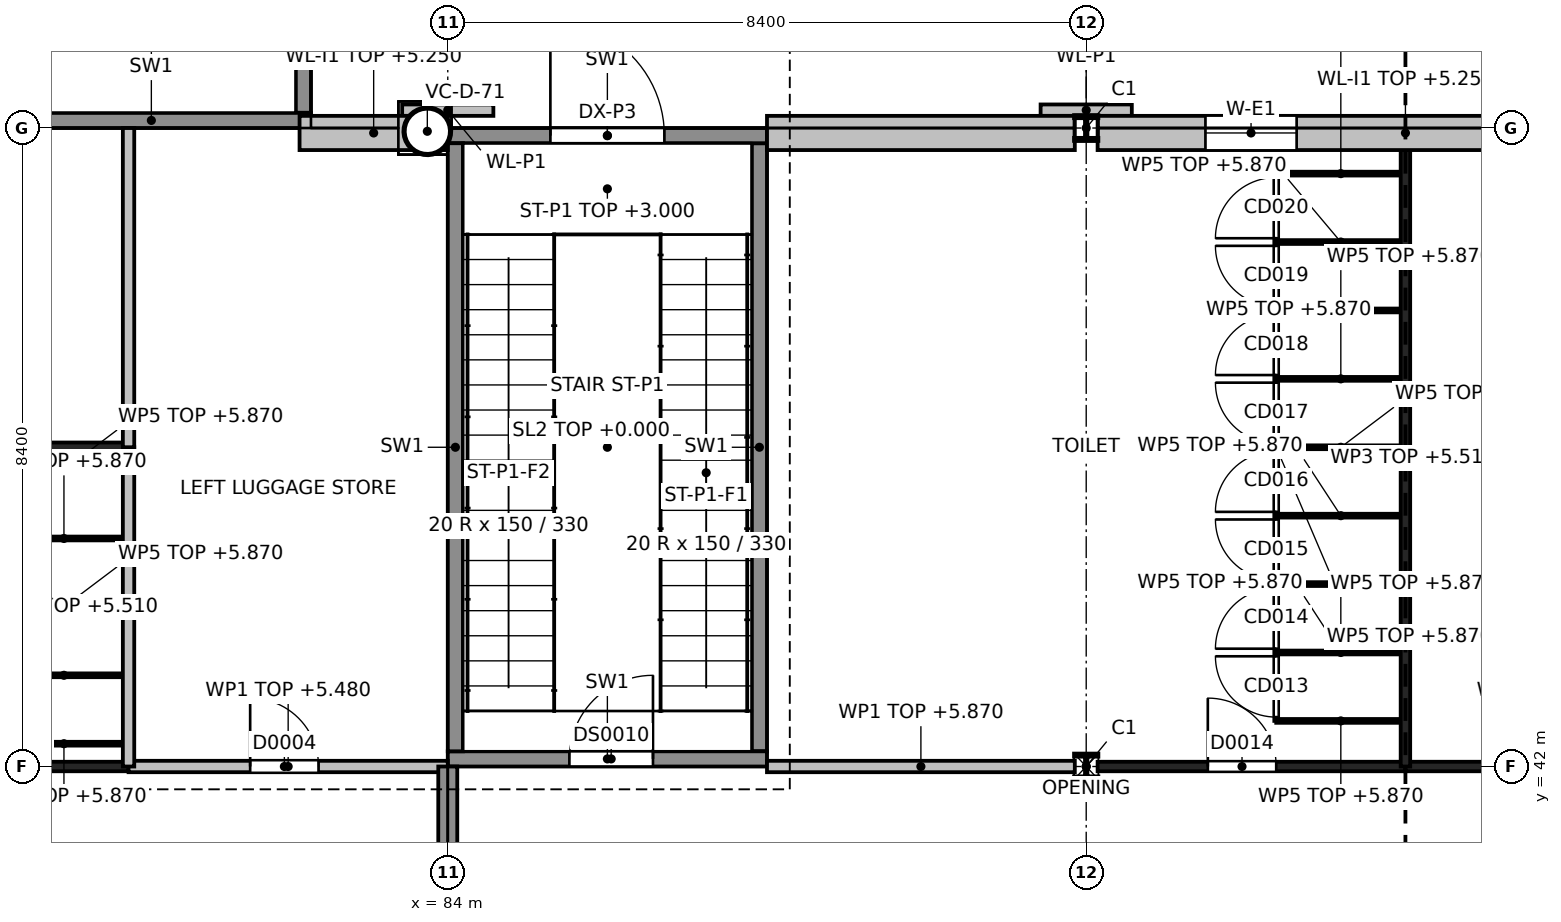
"""IFC4 building model, lengths in metres.
Left out: names, types, materials, properties, quantities, classifications, styles, units other than length and angle.
Written with IfcOpenShell. Run it as: python <this file> out.ifc"""

import sys

from ifc_helpers import new_model, si_unit, direction, frame, frame_2d, origin, origin_2d, place, context, subcontext, project, spatial, rectangle, hollow_circle, i_section, extrude, element, fill, save


model = new_model("IFC4")
c1 = context("Model", 3, precision=1e-05, world=origin(), true_north=direction((0.0, 1.0)))
c2 = subcontext(c1, "Body", "Model", "MODEL_VIEW")
j1 = project(units=[si_unit("LENGTHUNIT", "METRE"), si_unit("PLANEANGLEUNIT", "RADIAN")], contexts=[c1])
p1 = place(None, origin())
s1 = spatial("IfcSite", under=j1, at=p1, CompositionType="ELEMENT")
p2 = place(p1, origin())
s2 = spatial("IfcBuilding", under=s1, at=p2, CompositionType="ELEMENT")
p3 = place(p2, origin())
s3 = spatial("IfcBuildingStorey", under=s2, at=p3, CompositionType="ELEMENT", Elevation=0.0)
p4 = place(p3, frame((83.7, 50.4, -1.35), z_axis=(0.012121219783, -0.01683687241, 0.999784774718), x_axis=(0.811564701734, 0.584262556475, 0.0)))
e1 = element("IfcColumn", 1, at=p4, inside=s3, PredefinedType="COLUMN", context=c2, shape_type="SweptSolid", body=[
    extrude(hollow_circle(Radius=0.305, WallThickness=0.02, at=origin_2d()), origin(), (0.0, 0.0, 1.0), 7.352),
])
for number, where, z_axis, x_axis in (
    (2, (92.4, 42.0, -1.35), (0.0, 0.0, 1.0), (1.0, 0.0, 0.0)),
    (3, (92.4, 50.4, -1.35), (0.0, 0.0, 1.0), (1.0, 0.0, 0.0)),
):
    element("IfcColumn", number, at=place(p3, frame(where, z_axis=z_axis, x_axis=x_axis)), inside=s3, PredefinedType="COLUMN", context=c2, shape_type="SweptSolid", body=[
        extrude(i_section(OverallWidth=0.3, OverallDepth=0.32, WebThickness=0.011, FlangeThickness=0.021, at=origin_2d()), origin(), (0.0, 0.0, 1.0), 7.35),
    ])
p5 = place(p3, frame((78.0, 50.5, -1.35), z_axis=(0.0, 0.0, 1.0), x_axis=(1.0, 0.0, 0.0)))
e4 = element("IfcWall", 4, at=p5, inside=s3, PredefinedType="SHEAR", context=c2, shape_type="SweptSolid", body=[
    extrude(rectangle(XDim=4.2, YDim=0.2, at=frame_2d((2.1, 0.0))), origin(), (0.0, 0.0, 1.0), 7.35),
])
p6 = place(p3, frame((82.1, 50.6, -1.35), z_axis=(0.0, 0.0, 1.0), x_axis=(0.0, 1.0, 0.0)))
e5 = element("IfcWall", 5, at=p6, inside=s3, PredefinedType="SHEAR", context=c2, shape_type="SweptSolid", body=[
    extrude(rectangle(XDim=8.0, YDim=0.2, at=frame_2d((4.0, 0.0))), origin(), (0.0, 0.0, 1.0), 7.35),
])
p7 = place(p6, frame((3.25, 0.0, 1.35)))
e6 = element("IfcOpeningElement", 6, at=p7, cuts=e5, PredefinedType="OPENING", context=c2, shape_type="SweptSolid", body=[
    extrude(rectangle(XDim=1.5, YDim=2.4, at=frame_2d((0.75, 1.2))), frame((0.0, 0.1, 0.0), z_axis=(0.0, -1.0, 0.0), x_axis=(1.0, 0.0, 0.0)), (0.0, 0.0, 1.0), 0.2),
])
p8 = place(p3, frame((84.0, 42.1, -1.35), z_axis=(0.0, 0.0, 1.0), x_axis=(1.0, 0.0, 0.0)))
e7 = element("IfcWall", 7, at=p8, inside=s3, PredefinedType="SHEAR", context=c2, shape_type="SweptSolid", body=[
    extrude(rectangle(XDim=4.2, YDim=0.2, at=frame_2d((2.1, 0.0))), origin(), (0.0, 0.0, 1.0), 7.35),
])
p9 = place(p8, frame((1.6, 0.0, 1.35)))
e8 = element("IfcOpeningElement", 8, at=p9, cuts=e7, PredefinedType="OPENING", context=c2, shape_type="SweptSolid", body=[
    extrude(rectangle(XDim=1.1, YDim=2.1, at=frame_2d((0.55, 1.05))), frame((0.0, 0.1, 0.0), z_axis=(0.0, -1.0, 0.0), x_axis=(1.0, 0.0, 0.0)), (0.0, 0.0, 1.0), 0.2),
])
p10 = place(p3, frame((84.0, 50.3, -1.35), z_axis=(0.0, 0.0, 1.0), x_axis=(1.0, 0.0, 0.0)))
e9 = element("IfcWall", 9, at=p10, inside=s3, PredefinedType="SHEAR", context=c2, shape_type="SweptSolid", body=[
    extrude(rectangle(XDim=4.2, YDim=0.2, at=frame_2d((2.1, 0.0))), origin(), (0.0, 0.0, 1.0), 7.35),
])
p11 = place(p10, frame((1.35, 0.0, 1.35)))
e10 = element("IfcOpeningElement", 10, at=p11, cuts=e9, PredefinedType="OPENING", context=c2, shape_type="SweptSolid", body=[
    extrude(rectangle(XDim=1.5, YDim=2.4, at=frame_2d((0.75, 1.2))), frame((0.0, 0.1, 0.0), z_axis=(0.0, -1.0, 0.0), x_axis=(1.0, 0.0, 0.0)), (0.0, 0.0, 1.0), 0.2),
])
for number, where, z_axis, x_axis in (
    (11, (84.1, 42.2, -1.35), (0.0, 0.0, 1.0), (0.0, 1.0, 0.0)),
    (12, (88.1, 42.2, -1.35), (0.0, 0.0, 1.0), (0.0, 1.0, 0.0)),
):
    element("IfcWall", number, at=place(p3, frame(where, z_axis=z_axis, x_axis=x_axis)), inside=s3, PredefinedType="SHEAR", context=c2, shape_type="SweptSolid", body=[
        extrude(rectangle(XDim=8.0, YDim=0.2, at=frame_2d((4.0, 0.0))), origin(), (0.0, 0.0, 1.0), 7.35),
    ])
p12 = place(p3, frame((82.05, 50.335, 0.0), z_axis=(0.0, 0.0, 1.0), x_axis=(1.0, 0.0, 0.0)))
e13 = element("IfcWall", 13, at=p12, inside=s3, PredefinedType="SOLIDWALL", context=c2, shape_type="SweptSolid", body=[
    extrude(rectangle(XDim=1.95, YDim=0.45, at=frame_2d((0.975, 0.0))), origin(), (0.0, 0.0, 1.0), 5.25),
])
p13 = place(p3, frame((88.2, 50.335, 0.0), z_axis=(0.0, 0.0, 1.0), x_axis=(1.0, 0.0, 0.0)))
e14 = element("IfcWall", 14, at=p13, inside=s3, PredefinedType="SOLIDWALL", context=c2, shape_type="SweptSolid", body=[
    extrude(rectangle(XDim=4.05, YDim=0.45, at=frame_2d((2.025, 0.0))), origin(), (0.0, 0.0, 1.0), 5.25),
])
p14 = place(p3, frame((92.55, 50.335, 0.0), z_axis=(0.0, 0.0, 1.0), x_axis=(1.0, 0.0, 0.0)))
e15 = element("IfcWall", 15, at=p14, inside=s3, PredefinedType="SOLIDWALL", context=c2, shape_type="SweptSolid", body=[
    extrude(rectangle(XDim=8.1, YDim=0.45, at=frame_2d((4.05, 0.0))), origin(), (0.0, 0.0, 1.0), 5.25),
])
p15 = place(p14, frame((1.419, 0.0, 0.9)))
e16 = element("IfcOpeningElement", 16, at=p15, cuts=e15, PredefinedType="OPENING", context=c2, shape_type="SweptSolid", body=[
    extrude(rectangle(XDim=1.2, YDim=3.0, at=frame_2d((0.6, 1.5))), frame((0.0, 0.225, 0.0), z_axis=(0.0, -1.0, 0.0), x_axis=(1.0, 0.0, 0.0)), (0.0, 0.0, 1.0), 0.45),
])
p16 = place(p14, frame((5.481, 0.0, 0.9)))
e17 = element("IfcOpeningElement", 17, at=p16, cuts=e15, PredefinedType="OPENING", context=c2, shape_type="SweptSolid", body=[
    extrude(rectangle(XDim=1.2, YDim=3.0, at=frame_2d((0.6, 1.5))), frame((0.0, 0.225, 0.0), z_axis=(0.0, -1.0, 0.0), x_axis=(1.0, 0.0, 0.0)), (0.0, 0.0, 1.0), 0.45),
])
p17 = place(p3, frame((83.4, 50.635, 0.0), z_axis=(0.0, 0.0, 1.0), x_axis=(1.0, 0.0, 0.0)))
e18 = element("IfcWall", 18, at=p17, inside=s3, PredefinedType="SOLIDWALL", context=c2, shape_type="SweptSolid", body=[
    extrude(rectangle(XDim=1.2, YDim=0.15, at=frame_2d((0.6, 0.0))), origin(), (0.0, 0.0, 1.0), 6.0),
])
p18 = place(p3, frame((91.8, 50.635, 0.0), z_axis=(0.0, 0.0, 1.0), x_axis=(1.0, 0.0, 0.0)))
e19 = element("IfcWall", 19, at=p18, inside=s3, PredefinedType="SOLIDWALL", context=c2, shape_type="SweptSolid", body=[
    extrude(rectangle(XDim=1.2, YDim=0.15, at=frame_2d((0.6, 0.0))), origin(), (0.0, 0.0, 1.0), 6.0),
])
p19 = place(p3, frame((75.75, 42.0, 0.0), z_axis=(0.0, 0.0, 1.0), x_axis=(1.0, 0.0, 0.0)))
e20 = element("IfcWall", 20, at=p19, inside=s3, PredefinedType="PARTITIONING", context=c2, shape_type="SweptSolid", body=[
    extrude(rectangle(XDim=4.05, YDim=0.125, at=frame_2d((2.025, 0.0))), origin(), (0.0, 0.0, 1.0), 5.51),
])
p20 = place(p3, frame((79.8, 42.0, 0.0), z_axis=(0.0, 0.0, 1.0), x_axis=(1.0, 0.0, 0.0)))
e21 = element("IfcWall", 21, at=p20, inside=s3, PredefinedType="PARTITIONING", context=c2, shape_type="SweptSolid", body=[
    extrude(rectangle(XDim=4.2, YDim=0.15, at=frame_2d((2.1, 0.0))), origin(), (0.0, 0.0, 1.0), 5.48),
])
p21 = place(p20, frame((1.6, 0.0, 0.0)))
e22 = element("IfcOpeningElement", 22, at=p21, cuts=e21, PredefinedType="OPENING", context=c2, shape_type="SweptSolid", body=[
    extrude(rectangle(XDim=0.9, YDim=2.1, at=frame_2d((0.45, 1.05))), frame((0.0, 0.075, 0.0), z_axis=(0.0, -1.0, 0.0), x_axis=(1.0, 0.0, 0.0)), (0.0, 0.0, 1.0), 0.15),
])
p22 = place(p3, frame((84.0, 33.6, 0.0), z_axis=(0.0, 0.0, 1.0), x_axis=(0.0, 1.0, 0.0)))
e23 = element("IfcWall", 23, at=p22, inside=s3, PredefinedType="PARTITIONING", context=c2, shape_type="SweptSolid", body=[
    extrude(rectangle(XDim=8.4, YDim=0.25, at=frame_2d((4.2, 0.0))), origin(), (0.0, 0.0, 1.0), 5.48),
])
p23 = place(p22, frame((2.95, 0.0, 0.0)))
e24 = element("IfcOpeningElement", 24, at=p23, cuts=e23, PredefinedType="OPENING", context=c2, shape_type="SweptSolid", body=[
    extrude(rectangle(XDim=2.4, YDim=2.4, at=frame_2d((1.2, 1.2))), frame((0.0, 0.125, 0.0), z_axis=(0.0, -1.0, 0.0), x_axis=(1.0, 0.0, 0.0)), (0.0, 0.0, 1.0), 0.25),
])
p24 = place(p3, frame((75.6, 46.2, 0.0), z_axis=(0.0, 0.0, 1.0), x_axis=(1.0, 0.0, 0.0)))
e25 = element("IfcWall", 25, at=p24, inside=s3, PredefinedType="PARTITIONING", context=c2, shape_type="SweptSolid", body=[
    extrude(rectangle(XDim=4.2, YDim=0.125, at=frame_2d((2.1, 0.0))), origin(), (0.0, 0.0, 1.0), 5.48),
])
for number, where, z_axis, x_axis in (
    (26, (79.8, 42.0, 0.0), (0.0, 0.0, 1.0), (0.0, 1.0, 0.0)),
    (27, (79.8, 46.2, 0.0), (0.0, 0.0, 1.0), (0.0, 1.0, 0.0)),
):
    element("IfcWall", number, at=place(p3, frame(where, z_axis=z_axis, x_axis=x_axis)), inside=s3, PredefinedType="PARTITIONING", context=c2, shape_type="SweptSolid", body=[
        extrude(rectangle(XDim=4.2, YDim=0.15, at=frame_2d((2.1, 0.0))), origin(), (0.0, 0.0, 1.0), 5.51),
    ])
p25 = place(p3, frame((88.2, 42.0, 0.0), z_axis=(0.0, 0.0, 1.0), x_axis=(1.0, 0.0, 0.0)))
e28 = element("IfcWall", 28, at=p25, inside=s3, PredefinedType="PARTITIONING", context=c2, shape_type="SweptSolid", body=[
    extrude(rectangle(XDim=4.05, YDim=0.15, at=frame_2d((2.025, 0.0))), origin(), (0.0, 0.0, 1.0), 5.87),
])
p26 = place(p3, frame((92.55, 42.0, 0.0), z_axis=(0.0, 0.0, 1.0), x_axis=(1.0, 0.0, 0.0)))
e29 = element("IfcWall", 29, at=p26, inside=s3, PredefinedType="PARTITIONING", context=c2, shape_type="SweptSolid", body=[
    extrude(rectangle(XDim=4.05, YDim=0.125, at=frame_2d((2.025, 0.0))), origin(), (0.0, 0.0, 1.0), 5.51),
])
p27 = place(p26, frame((1.45, 0.0, 0.0)))
e30 = element("IfcOpeningElement", 30, at=p27, cuts=e29, PredefinedType="OPENING", context=c2, shape_type="SweptSolid", body=[
    extrude(rectangle(XDim=0.9, YDim=2.1, at=frame_2d((0.45, 1.05))), frame((0.0, 0.062, 0.0), z_axis=(0.0, -1.0, 0.0), x_axis=(1.0, 0.0, 0.0)), (0.0, 0.0, 1.0), 0.125),
])
p28 = place(p3, frame((96.6, 42.0, 0.0), z_axis=(0.0, 0.0, 1.0), x_axis=(1.0, 0.0, 0.0)))
e31 = element("IfcWall", 31, at=p28, inside=s3, PredefinedType="PARTITIONING", context=c2, shape_type="SweptSolid", body=[
    extrude(rectangle(XDim=4.05, YDim=0.125, at=frame_2d((2.025, 0.0))), origin(), (0.0, 0.0, 1.0), 5.51),
])
p29 = place(p28, frame((1.6, 0.0, 0.0)))
e32 = element("IfcOpeningElement", 32, at=p29, cuts=e31, PredefinedType="OPENING", context=c2, shape_type="SweptSolid", body=[
    extrude(rectangle(XDim=1.0, YDim=2.1, at=frame_2d((0.5, 1.05))), frame((0.0, 0.062, 0.0), z_axis=(0.0, -1.0, 0.0), x_axis=(1.0, 0.0, 0.0)), (0.0, 0.0, 1.0), 0.125),
])
p30 = place(p3, frame((96.6, 42.0, 0.0), z_axis=(0.0, 0.0, 1.0), x_axis=(0.0, 1.0, 0.0)))
e33 = element("IfcWall", 33, at=p30, inside=s3, PredefinedType="PARTITIONING", context=c2, shape_type="SweptSolid", body=[
    extrude(rectangle(XDim=8.11, YDim=0.125, at=frame_2d((4.055, 0.0))), origin(), (0.0, 0.0, 1.0), 5.51),
])
for number, where, z_axis, x_axis in (
    (34, (79.8, 42.3, 0.0), (0.0, 0.0, 1.0), (-1.0, 0.0, 0.0)),
    (35, (79.8, 43.2, 0.0), (0.0, 0.0, 1.0), (-1.0, 0.0, 0.0)),
    (36, (79.8, 44.1, 0.0), (0.0, 0.0, 1.0), (-1.0, 0.0, 0.0)),
    (37, (79.8, 45.0, 0.0), (0.0, 0.0, 1.0), (-1.0, 0.0, 0.0)),
    (38, (79.8, 45.9, 0.0), (0.0, 0.0, 1.0), (-1.0, 0.0, 0.0)),
):
    element("IfcWall", number, at=place(p3, frame(where, z_axis=z_axis, x_axis=x_axis)), inside=s3, PredefinedType="PARTITIONING", context=c2, shape_type="SweptSolid", body=[
        extrude(rectangle(XDim=1.7, YDim=0.05, at=frame_2d((0.85, 0.0))), origin(), (0.0, 0.0, 1.0), 5.87),
    ])
p31 = place(p3, frame((94.9, 42.6, 0.0), z_axis=(0.0, 0.0, 1.0), x_axis=(0.0, 1.0, 0.0)))
e39 = element("IfcWall", 39, at=p31, inside=s3, PredefinedType="PARTITIONING", context=c2, shape_type="SweptSolid", body=[
    extrude(rectangle(XDim=7.2, YDim=0.05, at=frame_2d((3.6, 0.0))), origin(), (0.0, 0.0, 1.0), 5.87),
])
p32 = place(p31, frame((0.05, 0.0, 0.0)))
e40 = element("IfcOpeningElement", 40, at=p32, cuts=e39, PredefinedType="OPENING", context=c2, shape_type="SweptSolid", body=[
    extrude(rectangle(XDim=0.8, YDim=2.0, at=frame_2d((0.4, 1.0))), frame((0.0, 0.025, 0.0), z_axis=(0.0, -1.0, 0.0), x_axis=(1.0, 0.0, 0.0)), (0.0, 0.0, 1.0), 0.05),
])
p33 = place(p31, frame((0.95, 0.0, 0.0)))
e41 = element("IfcOpeningElement", 41, at=p33, cuts=e39, PredefinedType="OPENING", context=c2, shape_type="SweptSolid", body=[
    extrude(rectangle(XDim=0.8, YDim=2.0, at=frame_2d((0.4, 1.0))), frame((0.0, 0.025, 0.0), z_axis=(0.0, -1.0, 0.0), x_axis=(1.0, 0.0, 0.0)), (0.0, 0.0, 1.0), 0.05),
])
p34 = place(p31, frame((1.85, 0.0, 0.0)))
e42 = element("IfcOpeningElement", 42, at=p34, cuts=e39, PredefinedType="OPENING", context=c2, shape_type="SweptSolid", body=[
    extrude(rectangle(XDim=0.8, YDim=2.0, at=frame_2d((0.4, 1.0))), frame((0.0, 0.025, 0.0), z_axis=(0.0, -1.0, 0.0), x_axis=(1.0, 0.0, 0.0)), (0.0, 0.0, 1.0), 0.05),
])
p35 = place(p31, frame((2.75, 0.0, 0.0)))
e43 = element("IfcOpeningElement", 43, at=p35, cuts=e39, PredefinedType="OPENING", context=c2, shape_type="SweptSolid", body=[
    extrude(rectangle(XDim=0.8, YDim=2.0, at=frame_2d((0.4, 1.0))), frame((0.0, 0.025, 0.0), z_axis=(0.0, -1.0, 0.0), x_axis=(1.0, 0.0, 0.0)), (0.0, 0.0, 1.0), 0.05),
])
p36 = place(p31, frame((3.65, 0.0, 0.0)))
e44 = element("IfcOpeningElement", 44, at=p36, cuts=e39, PredefinedType="OPENING", context=c2, shape_type="SweptSolid", body=[
    extrude(rectangle(XDim=0.8, YDim=2.0, at=frame_2d((0.4, 1.0))), frame((0.0, 0.025, 0.0), z_axis=(0.0, -1.0, 0.0), x_axis=(1.0, 0.0, 0.0)), (0.0, 0.0, 1.0), 0.05),
])
p37 = place(p31, frame((4.55, 0.0, 0.0)))
e45 = element("IfcOpeningElement", 45, at=p37, cuts=e39, PredefinedType="OPENING", context=c2, shape_type="SweptSolid", body=[
    extrude(rectangle(XDim=0.8, YDim=2.0, at=frame_2d((0.4, 1.0))), frame((0.0, 0.025, 0.0), z_axis=(0.0, -1.0, 0.0), x_axis=(1.0, 0.0, 0.0)), (0.0, 0.0, 1.0), 0.05),
])
p38 = place(p31, frame((5.45, 0.0, 0.0)))
e46 = element("IfcOpeningElement", 46, at=p38, cuts=e39, PredefinedType="OPENING", context=c2, shape_type="SweptSolid", body=[
    extrude(rectangle(XDim=0.8, YDim=2.0, at=frame_2d((0.4, 1.0))), frame((0.0, 0.025, 0.0), z_axis=(0.0, -1.0, 0.0), x_axis=(1.0, 0.0, 0.0)), (0.0, 0.0, 1.0), 0.05),
])
p39 = place(p31, frame((6.35, 0.0, 0.0)))
e47 = element("IfcOpeningElement", 47, at=p39, cuts=e39, PredefinedType="OPENING", context=c2, shape_type="SweptSolid", body=[
    extrude(rectangle(XDim=0.8, YDim=2.0, at=frame_2d((0.4, 1.0))), frame((0.0, 0.025, 0.0), z_axis=(0.0, -1.0, 0.0), x_axis=(1.0, 0.0, 0.0)), (0.0, 0.0, 1.0), 0.05),
])
for number, where, z_axis, x_axis in (
    (48, (96.6, 42.6, 0.0), (0.0, 0.0, 1.0), (-1.0, 0.0, 0.0)),
    (49, (96.6, 43.5, 0.0), (0.0, 0.0, 1.0), (-1.0, 0.0, 0.0)),
    (50, (96.6, 44.4, 0.0), (0.0, 0.0, 1.0), (-1.0, 0.0, 0.0)),
    (51, (96.6, 45.3, 0.0), (0.0, 0.0, 1.0), (-1.0, 0.0, 0.0)),
    (52, (96.6, 46.2, 0.0), (0.0, 0.0, 1.0), (-1.0, 0.0, 0.0)),
    (53, (96.6, 47.1, 0.0), (0.0, 0.0, 1.0), (-1.0, 0.0, 0.0)),
    (54, (96.6, 48.0, 0.0), (0.0, 0.0, 1.0), (-1.0, 0.0, 0.0)),
    (55, (96.6, 48.9, 0.0), (0.0, 0.0, 1.0), (-1.0, 0.0, 0.0)),
    (56, (96.6, 49.8, 0.0), (0.0, 0.0, 1.0), (-1.0, 0.0, 0.0)),
):
    element("IfcWall", number, at=place(p3, frame(where, z_axis=z_axis, x_axis=x_axis)), inside=s3, PredefinedType="PARTITIONING", context=c2, shape_type="SweptSolid", body=[
        extrude(rectangle(XDim=1.7, YDim=0.05, at=frame_2d((0.85, 0.0))), origin(), (0.0, 0.0, 1.0), 5.87),
    ])
p40 = place(p11, origin())
e57 = element("IfcDoor", 57, at=p40, inside=s3, OperationType="DOUBLE_DOOR_SINGLE_SWING", PredefinedType="DOOR", context=c2, shape_type="SweptSolid", body=[
    extrude(rectangle(XDim=1.5, YDim=2.4, at=frame_2d((0.75, 1.2))), frame((0.0, 0.025, 0.0), z_axis=(0.0, -1.0, 0.0), x_axis=(1.0, 0.0, 0.0)), (0.0, 0.0, 1.0), 0.05),
])
fill(e10, e57)
p41 = place(p15, origin())
e58 = element("IfcWindow", 58, at=p41, inside=s3, PartitioningType="SINGLE_PANEL", PredefinedType="WINDOW", context=c2, shape_type="SweptSolid", body=[
    extrude(rectangle(XDim=1.2, YDim=3.0, at=frame_2d((0.6, 1.5))), frame((0.0, 0.03, 0.0), z_axis=(0.0, -1.0, 0.0), x_axis=(1.0, 0.0, 0.0)), (0.0, 0.0, 1.0), 0.06),
])
fill(e16, e58)
p42 = place(p21, origin())
e59 = element("IfcDoor", 59, at=p42, inside=s3, OperationType="SINGLE_SWING_LEFT", PredefinedType="DOOR", context=c2, shape_type="SweptSolid", body=[
    extrude(rectangle(XDim=0.9, YDim=2.1, at=frame_2d((0.45, 1.05))), frame((0.0, 0.025, 0.0), z_axis=(0.0, -1.0, 0.0), x_axis=(1.0, 0.0, 0.0)), (0.0, 0.0, 1.0), 0.05),
])
fill(e22, e59)
p43 = place(p27, origin())
e60 = element("IfcDoor", 60, at=p43, inside=s3, OperationType="SINGLE_SWING_LEFT", PredefinedType="DOOR", context=c2, shape_type="SweptSolid", body=[
    extrude(rectangle(XDim=0.9, YDim=2.1, at=frame_2d((0.45, 1.05))), frame((0.0, 0.025, 0.0), z_axis=(0.0, -1.0, 0.0), x_axis=(1.0, 0.0, 0.0)), (0.0, 0.0, 1.0), 0.05),
])
fill(e30, e60)
p44 = place(p9, frame((1.1, 0.05, 0.0), z_axis=(0.0, 0.0, 1.0), x_axis=(-1.0, 0.0, 0.0)))
e61 = element("IfcDoor", 61, at=p44, inside=s3, OperationType="SINGLE_SWING_RIGHT", PredefinedType="DOOR", context=c2, shape_type="SweptSolid", body=[
    extrude(rectangle(XDim=1.1, YDim=2.1, at=frame_2d((0.55, 1.05))), frame((0.0, 0.025, 0.0), z_axis=(0.0, -1.0, 0.0), x_axis=(1.0, 0.0, 0.0)), (0.0, 0.0, 1.0), 0.05),
])
fill(e8, e61)
p45 = place(p32, origin())
e62 = element("IfcDoor", 62, at=p45, inside=s3, OperationType="SINGLE_SWING_RIGHT", PredefinedType="DOOR", context=c2, shape_type="SweptSolid", body=[
    extrude(rectangle(XDim=0.8, YDim=2.0, at=frame_2d((0.4, 1.0))), frame((0.0, 0.025, 0.0), z_axis=(0.0, -1.0, 0.0), x_axis=(1.0, 0.0, 0.0)), (0.0, 0.0, 1.0), 0.05),
])
fill(e40, e62)
p46 = place(p33, origin())
e63 = element("IfcDoor", 63, at=p46, inside=s3, OperationType="SINGLE_SWING_LEFT", PredefinedType="DOOR", context=c2, shape_type="SweptSolid", body=[
    extrude(rectangle(XDim=0.8, YDim=2.0, at=frame_2d((0.4, 1.0))), frame((0.0, 0.025, 0.0), z_axis=(0.0, -1.0, 0.0), x_axis=(1.0, 0.0, 0.0)), (0.0, 0.0, 1.0), 0.05),
])
fill(e41, e63)
p47 = place(p34, origin())
e64 = element("IfcDoor", 64, at=p47, inside=s3, OperationType="SINGLE_SWING_RIGHT", PredefinedType="DOOR", context=c2, shape_type="SweptSolid", body=[
    extrude(rectangle(XDim=0.8, YDim=2.0, at=frame_2d((0.4, 1.0))), frame((0.0, 0.025, 0.0), z_axis=(0.0, -1.0, 0.0), x_axis=(1.0, 0.0, 0.0)), (0.0, 0.0, 1.0), 0.05),
])
fill(e42, e64)
p48 = place(p35, origin())
e65 = element("IfcDoor", 65, at=p48, inside=s3, OperationType="SINGLE_SWING_LEFT", PredefinedType="DOOR", context=c2, shape_type="SweptSolid", body=[
    extrude(rectangle(XDim=0.8, YDim=2.0, at=frame_2d((0.4, 1.0))), frame((0.0, 0.025, 0.0), z_axis=(0.0, -1.0, 0.0), x_axis=(1.0, 0.0, 0.0)), (0.0, 0.0, 1.0), 0.05),
])
fill(e43, e65)
p49 = place(p36, origin())
e66 = element("IfcDoor", 66, at=p49, inside=s3, OperationType="SINGLE_SWING_RIGHT", PredefinedType="DOOR", context=c2, shape_type="SweptSolid", body=[
    extrude(rectangle(XDim=0.8, YDim=2.0, at=frame_2d((0.4, 1.0))), frame((0.0, 0.025, 0.0), z_axis=(0.0, -1.0, 0.0), x_axis=(1.0, 0.0, 0.0)), (0.0, 0.0, 1.0), 0.05),
])
fill(e44, e66)
p50 = place(p37, origin())
e67 = element("IfcDoor", 67, at=p50, inside=s3, OperationType="SINGLE_SWING_LEFT", PredefinedType="DOOR", context=c2, shape_type="SweptSolid", body=[
    extrude(rectangle(XDim=0.8, YDim=2.0, at=frame_2d((0.4, 1.0))), frame((0.0, 0.025, 0.0), z_axis=(0.0, -1.0, 0.0), x_axis=(1.0, 0.0, 0.0)), (0.0, 0.0, 1.0), 0.05),
])
fill(e45, e67)
p51 = place(p38, origin())
e68 = element("IfcDoor", 68, at=p51, inside=s3, OperationType="SINGLE_SWING_RIGHT", PredefinedType="DOOR", context=c2, shape_type="SweptSolid", body=[
    extrude(rectangle(XDim=0.8, YDim=2.0, at=frame_2d((0.4, 1.0))), frame((0.0, 0.025, 0.0), z_axis=(0.0, -1.0, 0.0), x_axis=(1.0, 0.0, 0.0)), (0.0, 0.0, 1.0), 0.05),
])
fill(e46, e68)
p52 = place(p39, origin())
e69 = element("IfcDoor", 69, at=p52, inside=s3, OperationType="SINGLE_SWING_LEFT", PredefinedType="DOOR", context=c2, shape_type="SweptSolid", body=[
    extrude(rectangle(XDim=0.8, YDim=2.0, at=frame_2d((0.4, 1.0))), frame((0.0, 0.025, 0.0), z_axis=(0.0, -1.0, 0.0), x_axis=(1.0, 0.0, 0.0)), (0.0, 0.0, 1.0), 0.05),
])
fill(e47, e69)
save(model, sys.argv[1])
